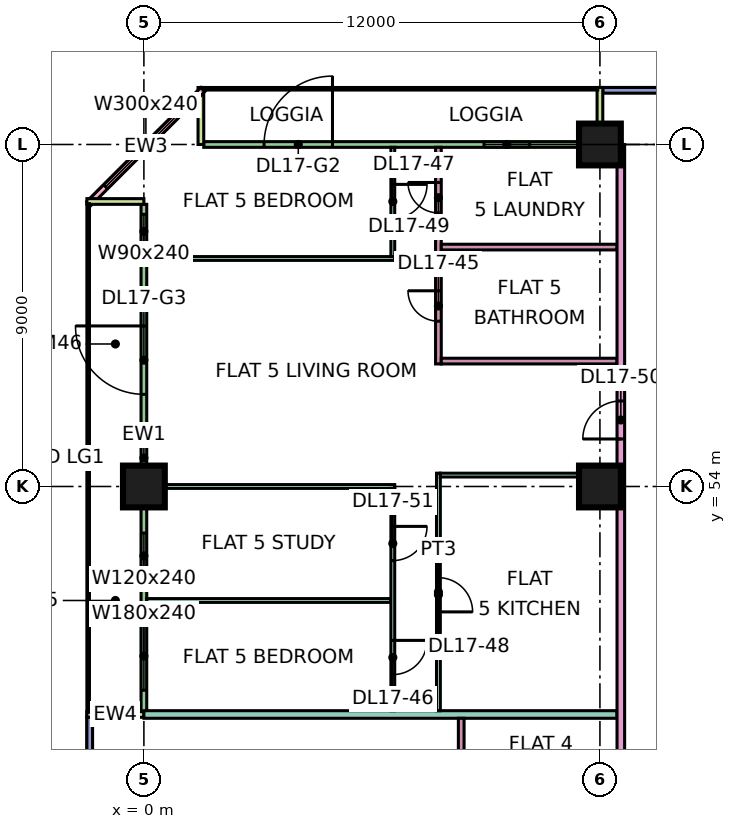
"""IFC4 building model, lengths in metres.
Left out: names, types, materials, properties, quantities, classifications, styles, units other than length and angle.
Written with IfcOpenShell. Run it as: python <this file> out.ifc"""

import sys

from ifc_helpers import new_model, si_unit, direction, frame, frame_2d, origin, origin_2d, place, context, subcontext, project, spatial, rectangle, extrude, element, fill, save


model = new_model("IFC4")
c1 = context("Model", 3, precision=1e-05, world=origin(), true_north=direction((0.0, 1.0)))
c2 = subcontext(c1, "Body", "Model", "MODEL_VIEW")
j1 = project(units=[si_unit("LENGTHUNIT", "METRE"), si_unit("PLANEANGLEUNIT", "RADIAN")], contexts=[c1])
p1 = place(None, origin())
s1 = spatial("IfcSite", under=j1, at=p1, CompositionType="ELEMENT")
p2 = place(p1, origin())
s2 = spatial("IfcBuilding", under=s1, at=p2, CompositionType="ELEMENT")
p3 = place(p2, frame((0.0, 0.0, 78.9)))
s3 = spatial("IfcBuildingStorey", under=s2, at=p3, CompositionType="ELEMENT", Elevation=78.9)
for number, where, z_axis, x_axis in (
    (1, (0.0, 54.0, 0.0), (0.0, 0.0, 1.0), (1.0, 0.0, 0.0)),
    (2, (12.0, 54.0, 0.0), (0.0, 0.0, 1.0), (1.0, 0.0, 0.0)),
    (3, (12.0, 63.0, 0.0), (0.0, 0.0, 1.0), (1.0, 0.0, 0.0)),
):
    element("IfcColumn", number, at=place(p3, frame(where, z_axis=z_axis, x_axis=x_axis)), inside=s3, PredefinedType="COLUMN", context=c2, shape_type="SweptSolid", body=[
        extrude(rectangle(XDim=1.1, YDim=1.1, at=origin_2d()), origin(), (0.0, 0.0, 1.0), 3.75),
    ])
p4 = place(p3, frame((22.5, 64.425, 0.0), z_axis=(0.0, 0.0, 1.0), x_axis=(-1.0, 0.0, 0.0)))
e4 = element("IfcWall", 4, at=p4, inside=s3, PredefinedType="SOLIDWALL", context=c2, shape_type="SweptSolid", body=[
    extrude(rectangle(XDim=10.425, YDim=0.15, at=frame_2d((5.212, 0.0))), origin(), (0.0, 0.0, 1.0), 3.35),
])
p5 = place(p4, frame((1.95, 0.0, 0.45)))
e5 = element("IfcOpeningElement", 5, at=p5, cuts=e4, PredefinedType="OPENING", context=c2, shape_type="SweptSolid", body=[
    extrude(rectangle(XDim=3.0, YDim=2.4, at=frame_2d((1.5, 1.2))), frame((0.0, 0.085, 0.0), z_axis=(0.0, -1.0, 0.0), x_axis=(1.0, 0.0, 0.0)), (0.0, 0.0, 1.0), 0.17),
])
p6 = place(p3, frame((11.925, 63.0, 0.0), z_axis=(0.0, 0.0, 1.0), x_axis=(-1.0, 0.0, 0.0)))
e6 = element("IfcWall", 6, at=p6, inside=s3, PredefinedType="SOLIDWALL", context=c2, shape_type="SweptSolid", body=[
    extrude(rectangle(XDim=10.35, YDim=0.15, at=frame_2d((5.175, 0.0))), origin(), (0.0, 0.0, 1.0), 3.35),
])
p7 = place(p6, frame((1.775, 0.0, 1.7)))
e7 = element("IfcOpeningElement", 7, at=p7, cuts=e6, PredefinedType="OPENING", context=c2, shape_type="SweptSolid", body=[
    extrude(rectangle(XDim=1.2, YDim=0.9, at=frame_2d((0.6, 0.45))), frame((0.0, 0.085, 0.0), z_axis=(0.0, -1.0, 0.0), x_axis=(1.0, 0.0, 0.0)), (0.0, 0.0, 1.0), 0.17),
])
p8 = place(p6, frame((6.962, 0.0, 0.0)))
e8 = element("IfcOpeningElement", 8, at=p8, cuts=e6, PredefinedType="OPENING", context=c2, shape_type="SweptSolid", body=[
    extrude(rectangle(XDim=1.8, YDim=2.4, at=frame_2d((0.9, 1.2))), frame((0.0, 0.085, 0.0), z_axis=(0.0, -1.0, 0.0), x_axis=(1.0, 0.0, 0.0)), (0.0, 0.0, 1.0), 0.17),
])
for number, where, z_axis, x_axis in (
    (9, (12.0, 64.5, 0.0), (0.0, 0.0, 1.0), (0.0, -1.0, 0.0)),
    (10, (1.5, 64.5, 0.0), (0.0, 0.0, 1.0), (0.0, -1.0, 0.0)),
):
    element("IfcWall", number, at=place(p3, frame(where, z_axis=z_axis, x_axis=x_axis)), inside=s3, PredefinedType="SOLIDWALL", context=c2, shape_type="SweptSolid", body=[
        extrude(rectangle(XDim=1.5, YDim=0.15, at=frame_2d((0.75, 0.0))), origin(), (0.0, 0.0, 1.0), 3.35),
    ])
p9 = place(p3, frame((1.553, 64.447, 0.0), z_axis=(0.0, 0.0, 1.0), x_axis=(-0.707106781187, -0.707106781187, 0.0)))
e11 = element("IfcWall", 11, at=p9, inside=s3, PredefinedType="SOLIDWALL", context=c2, shape_type="SweptSolid", body=[
    extrude(rectangle(XDim=4.243, YDim=0.15, at=frame_2d((2.121, 0.0))), origin(), (0.0, 0.0, 1.0), 3.35),
])
p10 = place(p9, frame((0.621, 0.0, 0.45)))
e12 = element("IfcOpeningElement", 12, at=p10, cuts=e11, PredefinedType="OPENING", context=c2, shape_type="SweptSolid", body=[
    extrude(rectangle(XDim=3.0, YDim=2.4, at=frame_2d((1.5, 1.2))), frame((0.0, 0.085, 0.0), z_axis=(0.0, -1.0, 0.0), x_axis=(1.0, 0.0, 0.0)), (0.0, 0.0, 1.0), 0.17),
])
p11 = place(p3, frame((0.0, 61.425, 0.0), z_axis=(0.0, 0.0, 1.0), x_axis=(0.0, -1.0, 0.0)))
e13 = element("IfcWall", 13, at=p11, inside=s3, PredefinedType="SOLIDWALL", context=c2, shape_type="SweptSolid", body=[
    extrude(rectangle(XDim=13.35, YDim=0.15, at=frame_2d((6.675, 0.0))), origin(), (0.0, 0.0, 1.0), 3.35),
])
p12 = place(p11, frame((0.262, 0.0, 0.45)))
e14 = element("IfcOpeningElement", 14, at=p12, cuts=e13, PredefinedType="OPENING", context=c2, shape_type="SweptSolid", body=[
    extrude(rectangle(XDim=0.9, YDim=2.4, at=frame_2d((0.45, 1.2))), frame((0.0, 0.085, 0.0), z_axis=(0.0, -1.0, 0.0), x_axis=(1.0, 0.0, 0.0)), (0.0, 0.0, 1.0), 0.17),
])
p13 = place(p11, frame((3.2, 0.0, 0.0)))
e15 = element("IfcOpeningElement", 15, at=p13, cuts=e13, PredefinedType="OPENING", context=c2, shape_type="SweptSolid", body=[
    extrude(rectangle(XDim=1.8, YDim=2.4, at=frame_2d((0.9, 1.2))), frame((0.0, 0.085, 0.0), z_axis=(0.0, -1.0, 0.0), x_axis=(1.0, 0.0, 0.0)), (0.0, 0.0, 1.0), 0.17),
])
p14 = place(p11, frame((8.65, 0.0, 0.45)))
e16 = element("IfcOpeningElement", 16, at=p14, cuts=e13, PredefinedType="OPENING", context=c2, shape_type="SweptSolid", body=[
    extrude(rectangle(XDim=1.2, YDim=2.4, at=frame_2d((0.6, 1.2))), frame((0.0, 0.085, 0.0), z_axis=(0.0, -1.0, 0.0), x_axis=(1.0, 0.0, 0.0)), (0.0, 0.0, 1.0), 0.17),
])
p15 = place(p11, frame((10.988, 0.0, 0.45)))
e17 = element("IfcOpeningElement", 17, at=p15, cuts=e13, PredefinedType="OPENING", context=c2, shape_type="SweptSolid", body=[
    extrude(rectangle(XDim=1.8, YDim=2.4, at=frame_2d((0.9, 1.2))), frame((0.0, 0.085, 0.0), z_axis=(0.0, -1.0, 0.0), x_axis=(1.0, 0.0, 0.0)), (0.0, 0.0, 1.0), 0.17),
])
for number, where, z_axis, x_axis in (
    (18, (-1.5, 61.5, 0.0), (0.0, 0.0, 1.0), (1.0, 0.0, 0.0)),
    (19, (-1.5, 48.0, 0.0), (0.0, 0.0, 1.0), (1.0, 0.0, 0.0)),
):
    element("IfcWall", number, at=place(p3, frame(where, z_axis=z_axis, x_axis=x_axis)), inside=s3, PredefinedType="SOLIDWALL", context=c2, shape_type="SweptSolid", body=[
        extrude(rectangle(XDim=1.5, YDim=0.15, at=frame_2d((0.75, 0.0))), origin(), (0.0, 0.0, 1.0), 3.35),
    ])
p16 = place(p3, frame((-1.425, 47.925, 0.0), z_axis=(0.0, 0.0, 1.0), x_axis=(0.0, -1.0, 0.0)))
e20 = element("IfcWall", 20, at=p16, inside=s3, PredefinedType="SOLIDWALL", context=c2, shape_type="SweptSolid", body=[
    extrude(rectangle(XDim=11.85, YDim=0.15, at=frame_2d((5.925, 0.0))), origin(), (0.0, 0.0, 1.0), 3.35),
])
p17 = place(p16, frame((1.462, 0.0, 0.45)))
e21 = element("IfcOpeningElement", 21, at=p17, cuts=e20, PredefinedType="OPENING", context=c2, shape_type="SweptSolid", body=[
    extrude(rectangle(XDim=3.0, YDim=2.4, at=frame_2d((1.5, 1.2))), frame((0.0, 0.085, 0.0), z_axis=(0.0, -1.0, 0.0), x_axis=(1.0, 0.0, 0.0)), (0.0, 0.0, 1.0), 0.17),
])
p18 = place(p16, frame((7.387, 0.0, 0.45)))
e22 = element("IfcOpeningElement", 22, at=p18, cuts=e20, PredefinedType="OPENING", context=c2, shape_type="SweptSolid", body=[
    extrude(rectangle(XDim=3.0, YDim=2.4, at=frame_2d((1.5, 1.2))), frame((0.0, 0.085, 0.0), z_axis=(0.0, -1.0, 0.0), x_axis=(1.0, 0.0, 0.0)), (0.0, 0.0, 1.0), 0.17),
])
p19 = place(p3, frame((0.0, 48.0, 0.0), z_axis=(0.0, 0.0, 1.0), x_axis=(1.0, 0.0, 0.0)))
e23 = element("IfcWall", 23, at=p19, inside=s3, PredefinedType="PARTITIONING", context=c2, shape_type="SweptSolid", body=[
    extrude(rectangle(XDim=12.45, YDim=0.2, at=frame_2d((6.225, 0.0))), origin(), (0.0, 0.0, 1.0), 3.35),
])
p20 = place(p3, frame((0.074, 51.0, 0.0), z_axis=(0.0, 0.0, 1.0), x_axis=(1.0, 0.0, 0.0)))
e24 = element("IfcWall", 24, at=p20, inside=s3, PredefinedType="PARTITIONING", context=c2, shape_type="SweptSolid", body=[
    extrude(rectangle(XDim=6.426, YDim=0.1, at=frame_2d((3.213, 0.0))), origin(), (0.0, 0.0, 1.0), 3.35),
])
for number, where, z_axis, x_axis in (
    (25, (0.074, 54.0, 0.0), (0.0, 0.0, 1.0), (1.0, 0.0, 0.0)),
    (26, (0.074, 60.0, 0.0), (0.0, 0.0, 1.0), (1.0, 0.0, 0.0)),
):
    element("IfcWall", number, at=place(p3, frame(where, z_axis=z_axis, x_axis=x_axis)), inside=s3, PredefinedType="PARTITIONING", context=c2, shape_type="SweptSolid", body=[
        extrude(rectangle(XDim=6.526, YDim=0.1, at=frame_2d((3.263, 0.0))), origin(), (0.0, 0.0, 1.0), 3.35),
    ])
p21 = place(p3, frame((6.55, 48.1, 0.0), z_axis=(0.0, 0.0, 1.0), x_axis=(0.0, 1.0, 0.0)))
e27 = element("IfcWall", 27, at=p21, inside=s3, PredefinedType="PARTITIONING", context=c2, shape_type="SweptSolid", body=[
    extrude(rectangle(XDim=5.85, YDim=0.1, at=frame_2d((2.925, 0.0))), origin(), (0.0, 0.0, 1.0), 3.35),
])
p22 = place(p21, frame((0.95, 0.0, 0.0)))
e28 = element("IfcOpeningElement", 28, at=p22, cuts=e27, PredefinedType="OPENING", context=c2, shape_type="SweptSolid", body=[
    extrude(rectangle(XDim=0.9, YDim=2.1, at=frame_2d((0.45, 1.05))), frame((0.0, 0.06, 0.0), z_axis=(0.0, -1.0, 0.0), x_axis=(1.0, 0.0, 0.0)), (0.0, 0.0, 1.0), 0.12),
])
p23 = place(p21, frame((3.95, 0.0, 0.0)))
e29 = element("IfcOpeningElement", 29, at=p23, cuts=e27, PredefinedType="OPENING", context=c2, shape_type="SweptSolid", body=[
    extrude(rectangle(XDim=0.9, YDim=2.1, at=frame_2d((0.45, 1.05))), frame((0.0, 0.06, 0.0), z_axis=(0.0, -1.0, 0.0), x_axis=(1.0, 0.0, 0.0)), (0.0, 0.0, 1.0), 0.12),
])
p24 = place(p3, frame((6.55, 60.05, 0.0), z_axis=(0.0, 0.0, 1.0), x_axis=(0.0, 1.0, 0.0)))
e30 = element("IfcWall", 30, at=p24, inside=s3, PredefinedType="PARTITIONING", context=c2, shape_type="SweptSolid", body=[
    extrude(rectangle(XDim=2.876, YDim=0.1, at=frame_2d((1.438, 0.0))), origin(), (0.0, 0.0, 1.0), 3.35),
])
p25 = place(p24, frame((1.0, 0.0, 0.0)))
e31 = element("IfcOpeningElement", 31, at=p25, cuts=e30, PredefinedType="OPENING", context=c2, shape_type="SweptSolid", body=[
    extrude(rectangle(XDim=0.9, YDim=2.1, at=frame_2d((0.45, 1.05))), frame((0.0, 0.06, 0.0), z_axis=(0.0, -1.0, 0.0), x_axis=(1.0, 0.0, 0.0)), (0.0, 0.0, 1.0), 0.12),
])
p26 = place(p3, frame((7.75, 48.1, 0.0), z_axis=(0.0, 0.0, 1.0), x_axis=(0.0, 1.0, 0.0)))
e32 = element("IfcWall", 32, at=p26, inside=s3, PredefinedType="PARTITIONING", context=c2, shape_type="SweptSolid", body=[
    extrude(rectangle(XDim=6.25, YDim=0.1, at=frame_2d((3.125, 0.0))), origin(), (0.0, 0.0, 1.0), 3.35),
])
p27 = place(p26, frame((2.6, 0.0, 0.0)))
e33 = element("IfcOpeningElement", 33, at=p27, cuts=e32, PredefinedType="OPENING", context=c2, shape_type="SweptSolid", body=[
    extrude(rectangle(XDim=0.9, YDim=2.1, at=frame_2d((0.45, 1.05))), frame((0.0, 0.06, 0.0), z_axis=(0.0, -1.0, 0.0), x_axis=(1.0, 0.0, 0.0)), (0.0, 0.0, 1.0), 0.12),
])
p28 = place(p3, frame((7.75, 57.225, 0.0), z_axis=(0.0, 0.0, 1.0), x_axis=(0.0, 1.0, 0.0)))
e34 = element("IfcWall", 34, at=p28, inside=s3, PredefinedType="PARTITIONING", context=c2, shape_type="SweptSolid", body=[
    extrude(rectangle(XDim=5.701, YDim=0.15, at=frame_2d((2.851, 0.0))), origin(), (0.0, 0.0, 1.0), 3.35),
])
p29 = place(p28, frame((1.125, 0.0, 0.0)))
e35 = element("IfcOpeningElement", 35, at=p29, cuts=e34, PredefinedType="OPENING", context=c2, shape_type="SweptSolid", body=[
    extrude(rectangle(XDim=0.8, YDim=2.1, at=frame_2d((0.4, 1.05))), frame((0.0, 0.085, 0.0), z_axis=(0.0, -1.0, 0.0), x_axis=(1.0, 0.0, 0.0)), (0.0, 0.0, 1.0), 0.17),
])
p30 = place(p28, frame((3.975, 0.0, 0.0)))
e36 = element("IfcOpeningElement", 36, at=p30, cuts=e34, PredefinedType="OPENING", context=c2, shape_type="SweptSolid", body=[
    extrude(rectangle(XDim=0.8, YDim=2.1, at=frame_2d((0.4, 1.05))), frame((0.0, 0.085, 0.0), z_axis=(0.0, -1.0, 0.0), x_axis=(1.0, 0.0, 0.0)), (0.0, 0.0, 1.0), 0.17),
])
p31 = place(p3, frame((7.8, 54.3, 0.0), z_axis=(0.0, 0.0, 1.0), x_axis=(1.0, 0.0, 0.0)))
e37 = element("IfcWall", 37, at=p31, inside=s3, PredefinedType="PARTITIONING", context=c2, shape_type="SweptSolid", body=[
    extrude(rectangle(XDim=4.65, YDim=0.1, at=frame_2d((2.325, 0.0))), origin(), (0.0, 0.0, 1.0), 3.35),
])
for number, where, z_axis, x_axis in (
    (38, (7.825, 57.3, 0.0), (0.0, 0.0, 1.0), (1.0, 0.0, 0.0)),
    (39, (7.825, 60.3, 0.0), (0.0, 0.0, 1.0), (1.0, 0.0, 0.0)),
):
    element("IfcWall", number, at=place(p3, frame(where, z_axis=z_axis, x_axis=x_axis)), inside=s3, PredefinedType="PARTITIONING", context=c2, shape_type="SweptSolid", body=[
        extrude(rectangle(XDim=4.625, YDim=0.15, at=frame_2d((2.312, 0.0))), origin(), (0.0, 0.0, 1.0), 3.35),
    ])
p32 = place(p3, frame((8.35, 38.925, 0.0), z_axis=(0.0, 0.0, 1.0), x_axis=(0.0, 1.0, 0.0)))
e40 = element("IfcWall", 40, at=p32, inside=s3, PredefinedType="PARTITIONING", context=c2, shape_type="SweptSolid", body=[
    extrude(rectangle(XDim=8.975, YDim=0.15, at=frame_2d((4.487, 0.0))), origin(), (0.0, 0.0, 1.0), 3.35),
])
p33 = place(p32, frame((5.925, 0.0, 0.0)))
e41 = element("IfcOpeningElement", 41, at=p33, cuts=e40, PredefinedType="OPENING", context=c2, shape_type="SweptSolid", body=[
    extrude(rectangle(XDim=0.9, YDim=2.1, at=frame_2d((0.45, 1.05))), frame((0.0, 0.085, 0.0), z_axis=(0.0, -1.0, 0.0), x_axis=(1.0, 0.0, 0.0)), (0.0, 0.0, 1.0), 0.17),
])
p34 = place(p3, frame((12.55, 20.0, 0.0), z_axis=(0.0, 0.0, 1.0), x_axis=(0.0, 1.0, 0.0)))
e42 = element("IfcWall", 42, at=p34, inside=s3, PredefinedType="PARTITIONING", context=c2, shape_type="SweptSolid", body=[
    extrude(rectangle(XDim=43.0, YDim=0.2, at=frame_2d((21.5, 0.0))), origin(), (0.0, 0.0, 1.0), 3.35),
])
p35 = place(p34, frame((16.95, 0.0, 0.0)))
e43 = element("IfcOpeningElement", 43, at=p35, cuts=e42, PredefinedType="OPENING", context=c2, shape_type="SweptSolid", body=[
    extrude(rectangle(XDim=1.0, YDim=2.1, at=frame_2d((0.5, 1.05))), frame((0.0, 0.11, 0.0), z_axis=(0.0, -1.0, 0.0), x_axis=(1.0, 0.0, 0.0)), (0.0, 0.0, 1.0), 0.22),
])
p36 = place(p34, frame((35.25, 0.0, 0.0)))
e44 = element("IfcOpeningElement", 44, at=p36, cuts=e42, PredefinedType="OPENING", context=c2, shape_type="SweptSolid", body=[
    extrude(rectangle(XDim=1.0, YDim=2.1, at=frame_2d((0.5, 1.05))), frame((0.0, 0.11, 0.0), z_axis=(0.0, -1.0, 0.0), x_axis=(1.0, 0.0, 0.0)), (0.0, 0.0, 1.0), 0.22),
])
p37 = place(p34, frame((0.6, 0.0, 0.0)))
e45 = element("IfcOpeningElement", 45, at=p37, cuts=e42, PredefinedType="OPENING", context=c2, shape_type="SweptSolid", body=[
    extrude(rectangle(XDim=1.2, YDim=2.1, at=frame_2d((0.6, 1.05))), frame((0.0, 0.11, 0.0), z_axis=(0.0, -1.0, 0.0), x_axis=(1.0, 0.0, 0.0)), (0.0, 0.0, 1.0), 0.22),
])
p38 = place(p34, frame((14.1, 0.0, 0.0)))
e46 = element("IfcOpeningElement", 46, at=p38, cuts=e42, PredefinedType="OPENING", context=c2, shape_type="SweptSolid", body=[
    extrude(rectangle(XDim=1.0, YDim=2.1, at=frame_2d((0.5, 1.05))), frame((0.0, 0.11, 0.0), z_axis=(0.0, -1.0, 0.0), x_axis=(1.0, 0.0, 0.0)), (0.0, 0.0, 1.0), 0.22),
])
p39 = place(p7, origin())
e47 = element("IfcWindow", 47, at=p39, inside=s3, PartitioningType="SINGLE_PANEL", PredefinedType="WINDOW", context=c2, shape_type="SweptSolid", body=[
    extrude(rectangle(XDim=1.2, YDim=0.9, at=frame_2d((0.6, 0.45))), frame((0.0, 0.03, 0.0), z_axis=(0.0, -1.0, 0.0), x_axis=(1.0, 0.0, 0.0)), (0.0, 0.0, 1.0), 0.06),
])
fill(e7, e47)
p40 = place(p8, frame((1.8, 0.0, 0.0), z_axis=(0.0, 0.0, 1.0), x_axis=(-1.0, 0.0, 0.0)))
e48 = element("IfcDoor", 48, at=p40, inside=s3, OperationType="DOUBLE_DOOR_SINGLE_SWING", PredefinedType="DOOR", context=c2, shape_type="SweptSolid", body=[
    extrude(rectangle(XDim=1.8, YDim=2.4, at=frame_2d((0.9, 1.2))), frame((0.0, 0.025, 0.0), z_axis=(0.0, -1.0, 0.0), x_axis=(1.0, 0.0, 0.0)), (0.0, 0.0, 1.0), 0.05),
])
fill(e8, e48)
p41 = place(p10, origin())
e49 = element("IfcWindow", 49, at=p41, inside=s3, PartitioningType="SINGLE_PANEL", PredefinedType="WINDOW", context=c2, shape_type="SweptSolid", body=[
    extrude(rectangle(XDim=3.0, YDim=2.4, at=frame_2d((1.5, 1.2))), frame((0.0, 0.03, 0.0), z_axis=(0.0, -1.0, 0.0), x_axis=(1.0, 0.0, 0.0)), (0.0, 0.0, 1.0), 0.06),
])
fill(e12, e49)
p42 = place(p12, origin())
e50 = element("IfcWindow", 50, at=p42, inside=s3, PartitioningType="SINGLE_PANEL", PredefinedType="WINDOW", context=c2, shape_type="SweptSolid", body=[
    extrude(rectangle(XDim=0.9, YDim=2.4, at=frame_2d((0.45, 1.2))), frame((0.0, 0.03, 0.0), z_axis=(0.0, -1.0, 0.0), x_axis=(1.0, 0.0, 0.0)), (0.0, 0.0, 1.0), 0.06),
])
fill(e14, e50)
p43 = place(p13, frame((1.8, 0.0, 0.0), z_axis=(0.0, 0.0, 1.0), x_axis=(-1.0, 0.0, 0.0)))
e51 = element("IfcDoor", 51, at=p43, inside=s3, OperationType="DOUBLE_DOOR_SINGLE_SWING", PredefinedType="DOOR", context=c2, shape_type="SweptSolid", body=[
    extrude(rectangle(XDim=1.8, YDim=2.4, at=frame_2d((0.9, 1.2))), frame((0.0, 0.025, 0.0), z_axis=(0.0, -1.0, 0.0), x_axis=(1.0, 0.0, 0.0)), (0.0, 0.0, 1.0), 0.05),
])
fill(e15, e51)
p44 = place(p14, origin())
e52 = element("IfcWindow", 52, at=p44, inside=s3, PartitioningType="SINGLE_PANEL", PredefinedType="WINDOW", context=c2, shape_type="SweptSolid", body=[
    extrude(rectangle(XDim=1.2, YDim=2.4, at=frame_2d((0.6, 1.2))), frame((0.0, 0.03, 0.0), z_axis=(0.0, -1.0, 0.0), x_axis=(1.0, 0.0, 0.0)), (0.0, 0.0, 1.0), 0.06),
])
fill(e16, e52)
p45 = place(p15, origin())
e53 = element("IfcWindow", 53, at=p45, inside=s3, PartitioningType="SINGLE_PANEL", PredefinedType="WINDOW", context=c2, shape_type="SweptSolid", body=[
    extrude(rectangle(XDim=1.8, YDim=2.4, at=frame_2d((0.9, 1.2))), frame((0.0, 0.03, 0.0), z_axis=(0.0, -1.0, 0.0), x_axis=(1.0, 0.0, 0.0)), (0.0, 0.0, 1.0), 0.06),
])
fill(e17, e53)
p46 = place(p29, frame((0.8, 0.0, 0.0), z_axis=(0.0, 0.0, 1.0), x_axis=(-1.0, 0.0, 0.0)))
e54 = element("IfcDoor", 54, at=p46, inside=s3, OperationType="SINGLE_SWING_RIGHT", PredefinedType="DOOR", context=c2, shape_type="SweptSolid", body=[
    extrude(rectangle(XDim=0.8, YDim=2.1, at=frame_2d((0.4, 1.05))), frame((0.0, 0.025, 0.0), z_axis=(0.0, -1.0, 0.0), x_axis=(1.0, 0.0, 0.0)), (0.0, 0.0, 1.0), 0.05),
])
fill(e35, e54)
p47 = place(p22, origin())
e55 = element("IfcDoor", 55, at=p47, inside=s3, OperationType="SINGLE_SWING_RIGHT", PredefinedType="DOOR", context=c2, shape_type="SweptSolid", body=[
    extrude(rectangle(XDim=0.9, YDim=2.1, at=frame_2d((0.45, 1.05))), frame((0.0, 0.025, 0.0), z_axis=(0.0, -1.0, 0.0), x_axis=(1.0, 0.0, 0.0)), (0.0, 0.0, 1.0), 0.05),
])
fill(e28, e55)
p48 = place(p25, origin())
e56 = element("IfcDoor", 56, at=p48, inside=s3, OperationType="SINGLE_SWING_RIGHT", PredefinedType="DOOR", context=c2, shape_type="SweptSolid", body=[
    extrude(rectangle(XDim=0.9, YDim=2.1, at=frame_2d((0.45, 1.05))), frame((0.0, 0.025, 0.0), z_axis=(0.0, -1.0, 0.0), x_axis=(1.0, 0.0, 0.0)), (0.0, 0.0, 1.0), 0.05),
])
fill(e31, e56)
p49 = place(p27, frame((0.9, 0.0, 0.0), z_axis=(0.0, 0.0, 1.0), x_axis=(-1.0, 0.0, 0.0)))
e57 = element("IfcDoor", 57, at=p49, inside=s3, OperationType="SINGLE_SWING_LEFT", PredefinedType="DOOR", context=c2, shape_type="SweptSolid", body=[
    extrude(rectangle(XDim=0.9, YDim=2.1, at=frame_2d((0.45, 1.05))), frame((0.0, 0.025, 0.0), z_axis=(0.0, -1.0, 0.0), x_axis=(1.0, 0.0, 0.0)), (0.0, 0.0, 1.0), 0.05),
])
fill(e33, e57)
p50 = place(p30, frame((0.8, 0.0, 0.0), z_axis=(0.0, 0.0, 1.0), x_axis=(-1.0, 0.0, 0.0)))
e58 = element("IfcDoor", 58, at=p50, inside=s3, OperationType="SINGLE_SWING_RIGHT", PredefinedType="DOOR", context=c2, shape_type="SweptSolid", body=[
    extrude(rectangle(XDim=0.8, YDim=2.1, at=frame_2d((0.4, 1.05))), frame((0.0, 0.025, 0.0), z_axis=(0.0, -1.0, 0.0), x_axis=(1.0, 0.0, 0.0)), (0.0, 0.0, 1.0), 0.05),
])
fill(e36, e58)
p51 = place(p36, origin())
e59 = element("IfcDoor", 59, at=p51, inside=s3, OperationType="SINGLE_SWING_LEFT", PredefinedType="DOOR", context=c2, shape_type="SweptSolid", body=[
    extrude(rectangle(XDim=1.0, YDim=2.1, at=frame_2d((0.5, 1.05))), frame((0.0, 0.025, 0.0), z_axis=(0.0, -1.0, 0.0), x_axis=(1.0, 0.0, 0.0)), (0.0, 0.0, 1.0), 0.05),
])
fill(e44, e59)
p52 = place(p23, origin())
e60 = element("IfcDoor", 60, at=p52, inside=s3, OperationType="SINGLE_SWING_RIGHT", PredefinedType="DOOR", context=c2, shape_type="SweptSolid", body=[
    extrude(rectangle(XDim=0.9, YDim=2.1, at=frame_2d((0.45, 1.05))), frame((0.0, 0.025, 0.0), z_axis=(0.0, -1.0, 0.0), x_axis=(1.0, 0.0, 0.0)), (0.0, 0.0, 1.0), 0.05),
])
fill(e29, e60)
save(model, sys.argv[1])
